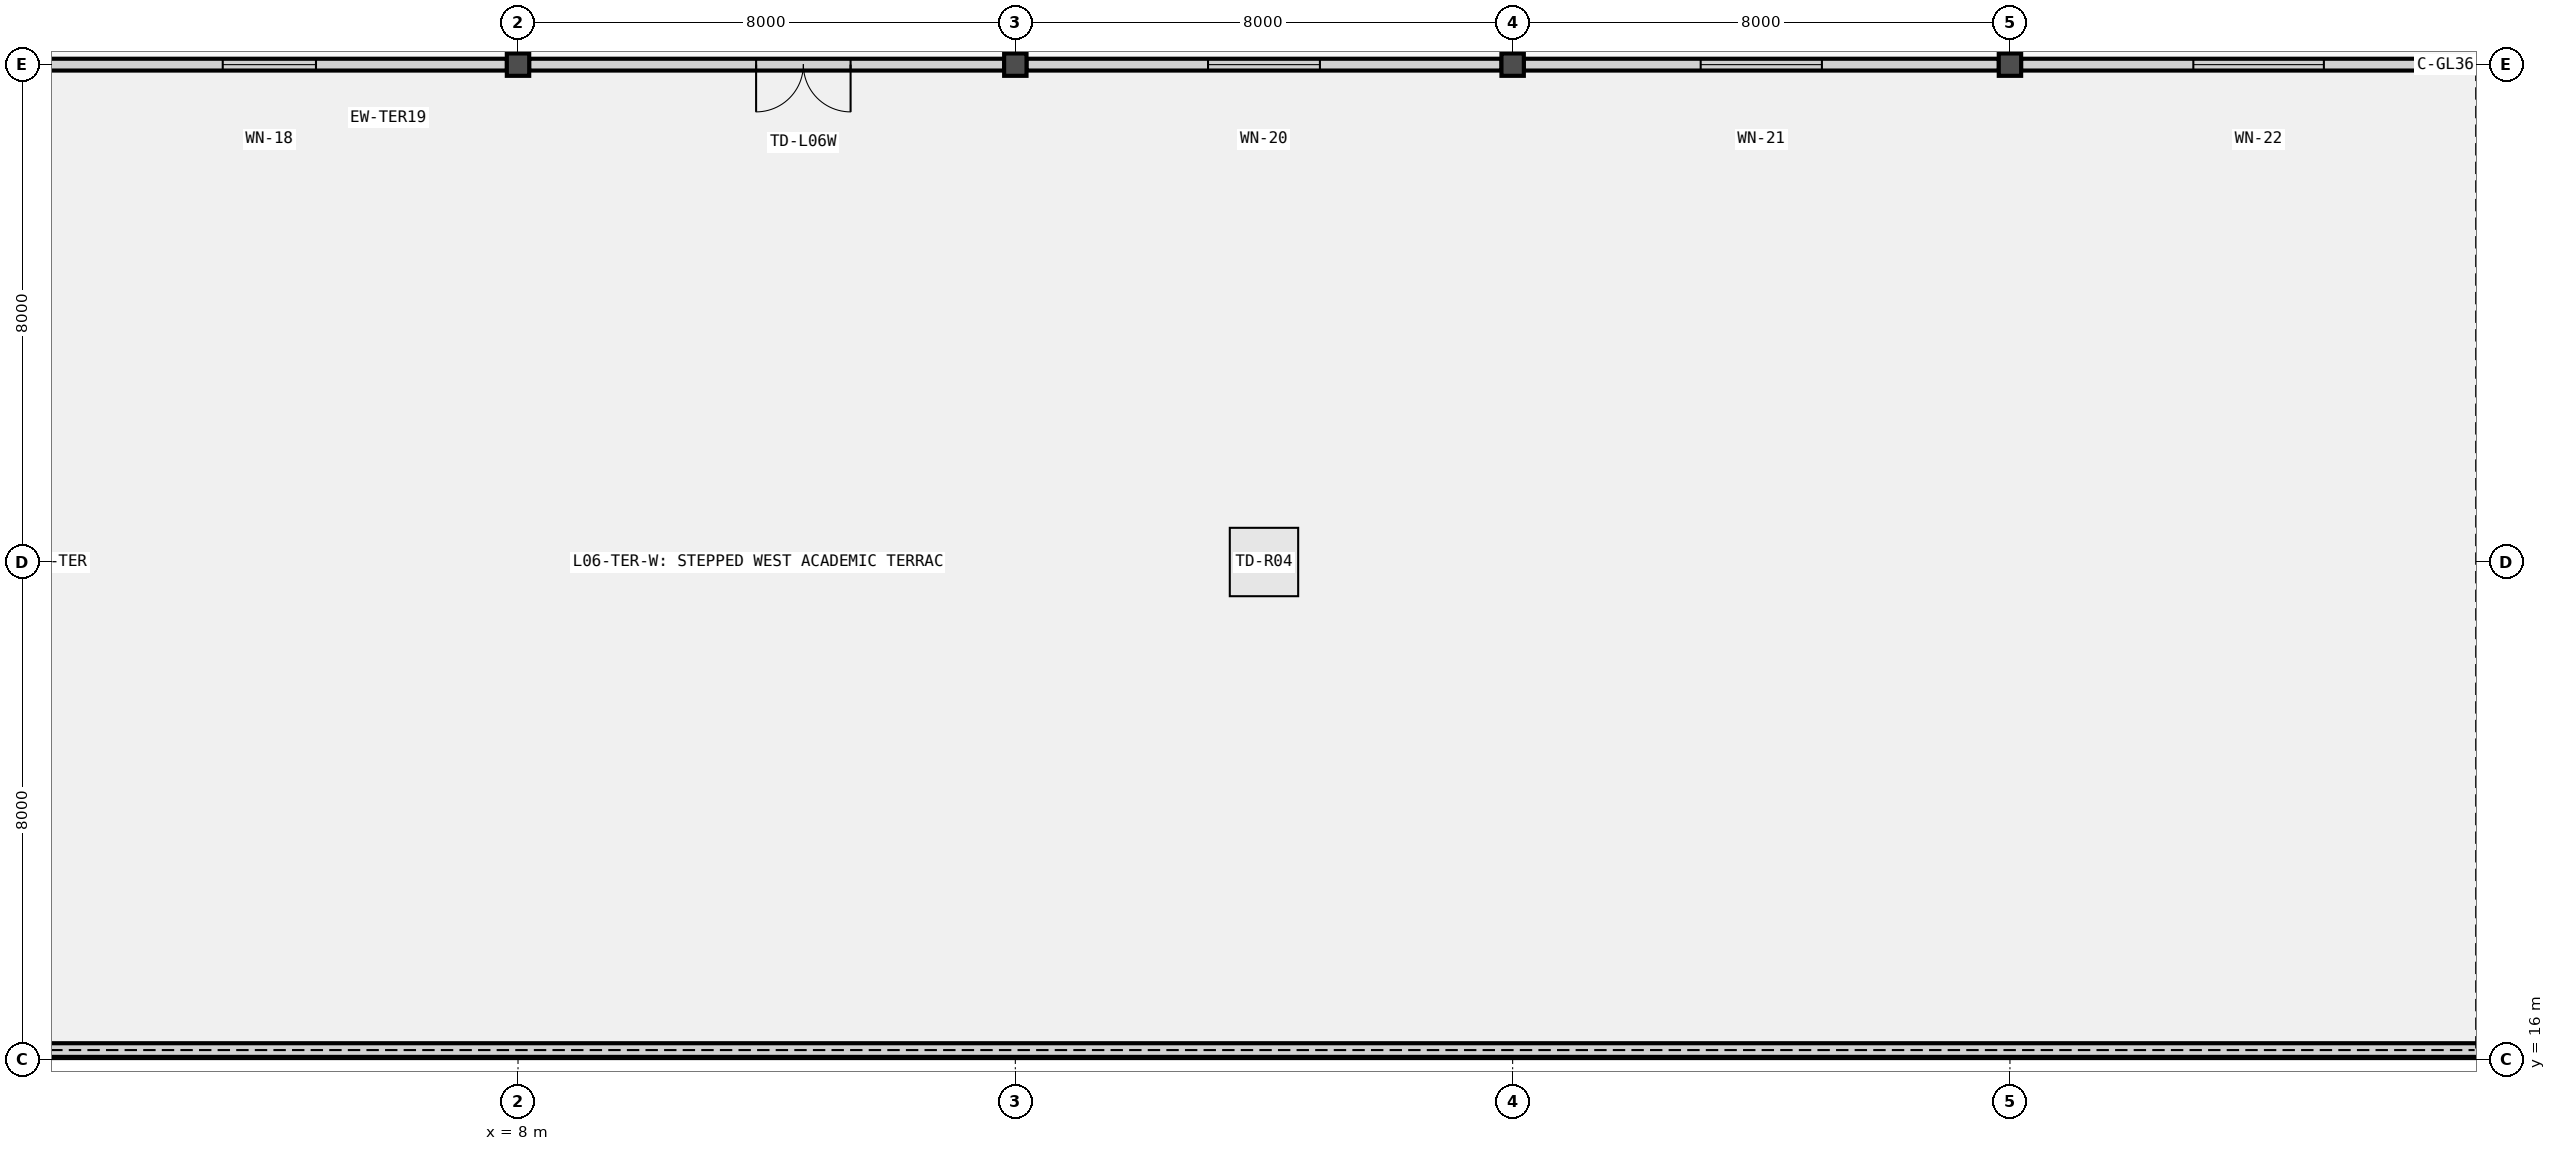
"""IFC4 building model, lengths in metres.
Left out: names, types, materials, properties, quantities, classifications, styles, units other than length and angle.
Written with IfcOpenShell. Run it as: python <this file> out.ifc"""

import sys

from ifc_helpers import new_model, si_unit, direction, frame, frame_2d, origin, origin_2d, place, context, subcontext, project, spatial, rectangle, extrude, element, fill, save


model = new_model("IFC4")
c1 = context("Model", 3, precision=1e-05, world=origin(), true_north=direction((0.0, 1.0)))
c2 = subcontext(c1, "Body", "Model", "MODEL_VIEW")
j1 = project(units=[si_unit("LENGTHUNIT", "METRE"), si_unit("PLANEANGLEUNIT", "RADIAN")], contexts=[c1])
p1 = place(None, origin())
s1 = spatial("IfcSite", under=j1, at=p1, CompositionType="ELEMENT")
p2 = place(p1, origin())
s2 = spatial("IfcBuilding", under=s1, at=p2, CompositionType="ELEMENT")
p3 = place(p2, frame((0.0, 0.0, 25.2)))
s3 = spatial("IfcBuildingStorey", under=s2, at=p3, CompositionType="ELEMENT", Elevation=25.2)
for number, where, z_axis, x_axis in (
    (1, (8.0, 32.0, 0.0), (0.0, 0.0, 1.0), (1.0, 0.0, 0.0)),
    (2, (16.0, 32.0, 0.0), (0.0, 0.0, 1.0), (1.0, 0.0, 0.0)),
    (3, (24.0, 32.0, 0.0), (0.0, 0.0, 1.0), (1.0, 0.0, 0.0)),
    (4, (32.0, 32.0, 0.0), (0.0, 0.0, 1.0), (1.0, 0.0, 0.0)),
):
    element("IfcColumn", number, at=place(p3, frame(where, z_axis=z_axis, x_axis=x_axis)), inside=s3, PredefinedType="COLUMN", context=c2, shape_type="SweptSolid", body=[
        extrude(rectangle(XDim=0.36, YDim=0.36, at=origin_2d()), origin(), (0.0, 0.0, 1.0), 3.6),
    ])
p4 = place(p3, frame((7.822, 32.0, 0.0), z_axis=(0.0, 0.0, 1.0), x_axis=(-1.0, 0.0, 0.0)))
e5 = element("IfcWall", 5, at=p4, inside=s3, PredefinedType="SOLIDWALL", context=c2, shape_type="SweptSolid", body=[
    extrude(rectangle(XDim=7.644, YDim=0.19, at=frame_2d((3.822, 0.0))), origin(), (0.0, 0.0, 1.0), 2.84),
])
p5 = place(p4, frame((3.072, 0.0, 0.88)))
e6 = element("IfcOpeningElement", 6, at=p5, cuts=e5, PredefinedType="OPENING", context=c2, shape_type="SweptSolid", body=[
    extrude(rectangle(XDim=1.5, YDim=1.5, at=frame_2d((0.75, 0.75))), frame((0.0, 0.105, 0.0), z_axis=(0.0, -1.0, 0.0), x_axis=(1.0, 0.0, 0.0)), (0.0, 0.0, 1.0), 0.21),
])
p6 = place(p3, frame((15.822, 32.0, 0.0), z_axis=(0.0, 0.0, 1.0), x_axis=(-1.0, 0.0, 0.0)))
e7 = element("IfcWall", 7, at=p6, inside=s3, PredefinedType="SOLIDWALL", context=c2, shape_type="SweptSolid", body=[
    extrude(rectangle(XDim=7.644, YDim=0.19, at=frame_2d((3.822, 0.0))), origin(), (0.0, 0.0, 1.0), 2.84),
])
p7 = place(p6, frame((2.472, 0.0, 0.0)))
e8 = element("IfcOpeningElement", 8, at=p7, cuts=e7, PredefinedType="OPENING", context=c2, shape_type="SweptSolid", body=[
    extrude(rectangle(XDim=1.52, YDim=2.2, at=frame_2d((0.76, 1.1))), frame((0.0, 0.105, 0.0), z_axis=(0.0, -1.0, 0.0), x_axis=(1.0, 0.0, 0.0)), (0.0, 0.0, 1.0), 0.21),
])
p8 = place(p3, frame((23.822, 32.0, 0.0), z_axis=(0.0, 0.0, 1.0), x_axis=(-1.0, 0.0, 0.0)))
e9 = element("IfcWall", 9, at=p8, inside=s3, PredefinedType="SOLIDWALL", context=c2, shape_type="SweptSolid", body=[
    extrude(rectangle(XDim=7.644, YDim=0.19, at=frame_2d((3.822, 0.0))), origin(), (0.0, 0.0, 1.0), 2.84),
])
p9 = place(p8, frame((2.922, 0.0, 0.88)))
e10 = element("IfcOpeningElement", 10, at=p9, cuts=e9, PredefinedType="OPENING", context=c2, shape_type="SweptSolid", body=[
    extrude(rectangle(XDim=1.8, YDim=1.55, at=frame_2d((0.9, 0.775))), frame((0.0, 0.105, 0.0), z_axis=(0.0, -1.0, 0.0), x_axis=(1.0, 0.0, 0.0)), (0.0, 0.0, 1.0), 0.21),
])
p10 = place(p3, frame((31.822, 32.0, 0.0), z_axis=(0.0, 0.0, 1.0), x_axis=(-1.0, 0.0, 0.0)))
e11 = element("IfcWall", 11, at=p10, inside=s3, PredefinedType="SOLIDWALL", context=c2, shape_type="SweptSolid", body=[
    extrude(rectangle(XDim=7.644, YDim=0.19, at=frame_2d((3.822, 0.0))), origin(), (0.0, 0.0, 1.0), 2.84),
])
p11 = place(p10, frame((2.847, 0.0, 0.88)))
e12 = element("IfcOpeningElement", 12, at=p11, cuts=e11, PredefinedType="OPENING", context=c2, shape_type="SweptSolid", body=[
    extrude(rectangle(XDim=1.95, YDim=1.55, at=frame_2d((0.975, 0.775))), frame((0.0, 0.105, 0.0), z_axis=(0.0, -1.0, 0.0), x_axis=(1.0, 0.0, 0.0)), (0.0, 0.0, 1.0), 0.21),
])
p12 = place(p3, frame((39.822, 32.0, 0.0), z_axis=(0.0, 0.0, 1.0), x_axis=(-1.0, 0.0, 0.0)))
e13 = element("IfcWall", 13, at=p12, inside=s3, PredefinedType="SOLIDWALL", context=c2, shape_type="SweptSolid", body=[
    extrude(rectangle(XDim=7.644, YDim=0.19, at=frame_2d((3.822, 0.0))), origin(), (0.0, 0.0, 1.0), 2.84),
])
p13 = place(p12, frame((2.772, 0.0, 0.88)))
e14 = element("IfcOpeningElement", 14, at=p13, cuts=e13, PredefinedType="OPENING", context=c2, shape_type="SweptSolid", body=[
    extrude(rectangle(XDim=2.1, YDim=1.6, at=frame_2d((1.05, 0.8))), frame((0.0, 0.105, 0.0), z_axis=(0.0, -1.0, 0.0), x_axis=(1.0, 0.0, 0.0)), (0.0, 0.0, 1.0), 0.21),
])
p14 = place(p3, frame((39.85, 16.15, 0.0), z_axis=(0.0, 0.0, 1.0), x_axis=(-1.0, 0.0, 0.0)))
e15 = element("IfcWall", 15, at=p14, inside=s3, PredefinedType="PARAPET", context=c2, shape_type="SweptSolid", body=[
    extrude(rectangle(XDim=39.7, YDim=0.22, at=frame_2d((19.85, 0.0))), origin(), (0.0, 0.0, 1.0), 1.15),
])
p15 = place(p5, origin())
e16 = element("IfcWindow", 16, at=p15, inside=s3, PartitioningType="SINGLE_PANEL", PredefinedType="WINDOW", context=c2, shape_type="SweptSolid", body=[
    extrude(rectangle(XDim=1.5, YDim=1.5, at=frame_2d((0.75, 0.75))), frame((0.0, 0.03, 0.0), z_axis=(0.0, -1.0, 0.0), x_axis=(1.0, 0.0, 0.0)), (0.0, 0.0, 1.0), 0.06),
])
fill(e6, e16)
p16 = place(p7, origin())
e17 = element("IfcDoor", 17, at=p16, inside=s3, OperationType="DOUBLE_DOOR_SINGLE_SWING", PredefinedType="DOOR", context=c2, shape_type="SweptSolid", body=[
    extrude(rectangle(XDim=1.52, YDim=2.2, at=frame_2d((0.76, 1.1))), frame((0.0, 0.025, 0.0), z_axis=(0.0, -1.0, 0.0), x_axis=(1.0, 0.0, 0.0)), (0.0, 0.0, 1.0), 0.05),
])
fill(e8, e17)
p17 = place(p9, origin())
e18 = element("IfcWindow", 18, at=p17, inside=s3, PartitioningType="SINGLE_PANEL", PredefinedType="WINDOW", context=c2, shape_type="SweptSolid", body=[
    extrude(rectangle(XDim=1.8, YDim=1.55, at=frame_2d((0.9, 0.775))), frame((0.0, 0.03, 0.0), z_axis=(0.0, -1.0, 0.0), x_axis=(1.0, 0.0, 0.0)), (0.0, 0.0, 1.0), 0.06),
])
fill(e10, e18)
p18 = place(p11, origin())
e19 = element("IfcWindow", 19, at=p18, inside=s3, PartitioningType="SINGLE_PANEL", PredefinedType="WINDOW", context=c2, shape_type="SweptSolid", body=[
    extrude(rectangle(XDim=1.95, YDim=1.55, at=frame_2d((0.975, 0.775))), frame((0.0, 0.03, 0.0), z_axis=(0.0, -1.0, 0.0), x_axis=(1.0, 0.0, 0.0)), (0.0, 0.0, 1.0), 0.06),
])
fill(e12, e19)
p19 = place(p13, origin())
e20 = element("IfcWindow", 20, at=p19, inside=s3, PartitioningType="SINGLE_PANEL", PredefinedType="WINDOW", context=c2, shape_type="SweptSolid", body=[
    extrude(rectangle(XDim=2.1, YDim=1.6, at=frame_2d((1.05, 0.8))), frame((0.0, 0.03, 0.0), z_axis=(0.0, -1.0, 0.0), x_axis=(1.0, 0.0, 0.0)), (0.0, 0.0, 1.0), 0.06),
])
fill(e14, e20)
p20 = place(p3, frame((0.0, 0.0, -0.24)))
p21 = place(p20, frame((20.0, 24.0, 0.0)))
p22 = place(p21, frame((0.0, 0.0, 0.19)))
e21 = element("IfcDoor", 21, at=p22, inside=s3, OperationType="SINGLE_SWING_LEFT", PredefinedType="TRAPDOOR", context=c2, shape_type="SweptSolid", body=[
    extrude(rectangle(XDim=1.1, YDim=1.1, at=origin_2d()), origin(), (0.0, 0.0, 1.0), 0.05),
])
save(model, sys.argv[1])
